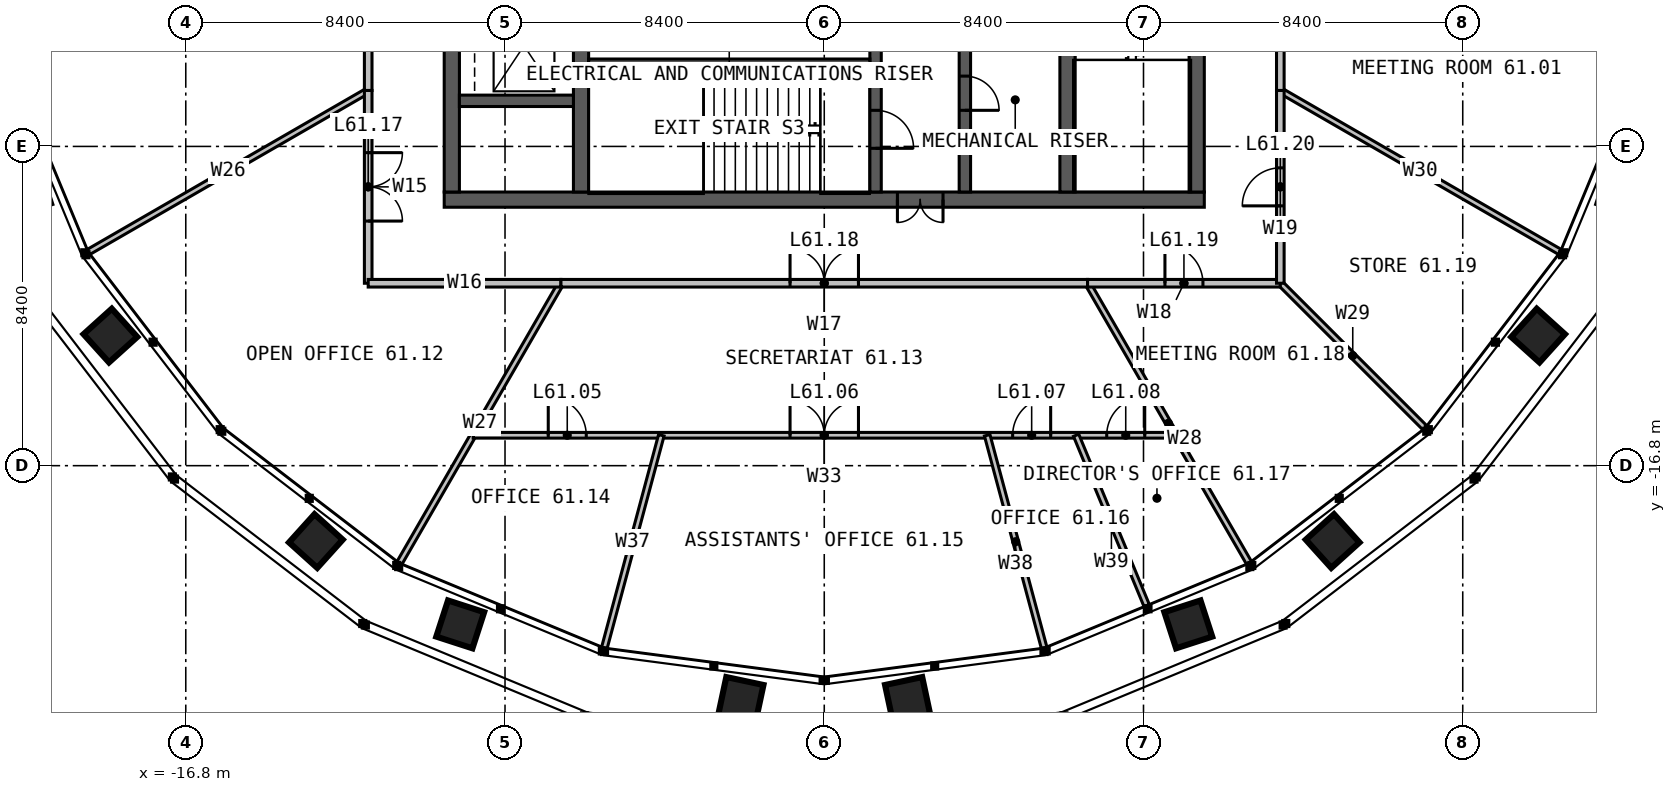
"""IFC4 building model, lengths in metres.
Left out: names, types, materials, properties, quantities, classifications, styles, units other than length and angle.
Written with IfcOpenShell. Run it as: python <this file> out.ifc"""

import sys

from ifc_helpers import new_model, si_unit, direction, frame, frame_2d, origin, place, context, subcontext, project, spatial, rectangle, extrude, element, fill, save


model = new_model("IFC4")
c1 = context("Model", 3, precision=1e-05, world=origin(), true_north=direction((0.0, 1.0)))
c2 = subcontext(c1, "Body", "Model", "MODEL_VIEW")
j1 = project(units=[si_unit("LENGTHUNIT", "METRE"), si_unit("PLANEANGLEUNIT", "RADIAN")], contexts=[c1])
p1 = place(None, origin())
s1 = spatial("IfcSite", under=j1, at=p1, CompositionType="ELEMENT")
p2 = place(p1, origin())
s2 = spatial("IfcBuilding", under=s1, at=p2, CompositionType="ELEMENT")
p3 = place(p2, frame((0.0, 0.0, 252.0)))
s3 = spatial("IfcBuildingStorey", under=s2, at=p3, CompositionType="ELEMENT", Elevation=252.0)
p4 = place(p3, frame((10.0, -9.8, 0.0), z_axis=(0.0, 0.0, 1.0), x_axis=(-1.0, 0.0, 0.0)))
e1 = element("IfcWall", 1, at=p4, inside=s3, PredefinedType="SOLIDWALL", context=c2, shape_type="SweptSolid", body=[
    extrude(rectangle(XDim=20.0, YDim=0.4, at=frame_2d((10.0, 0.0))), origin(), (0.0, 0.0, 1.0), 4.0),
])
p5 = place(p4, frame((6.875, 0.0, 0.0)))
e2 = element("IfcOpeningElement", 2, at=p5, cuts=e1, PredefinedType="OPENING", context=c2, shape_type="SweptSolid", body=[
    extrude(rectangle(XDim=1.2, YDim=2.2, at=frame_2d((0.6, 1.1))), frame((0.0, 0.21, 0.0), z_axis=(0.0, -1.0, 0.0), x_axis=(1.0, 0.0, 0.0)), (0.0, 0.0, 1.0), 0.42),
])
for number, where, z_axis, x_axis in (
    (3, (9.8, -9.6, 0.0), (0.0, 0.0, 1.0), (0.0, 1.0, 0.0)),
    (4, (-9.8, 9.6, 0.0), (0.0, 0.0, 1.0), (0.0, -1.0, 0.0)),
):
    element("IfcWall", number, at=place(p3, frame(where, z_axis=z_axis, x_axis=x_axis)), inside=s3, PredefinedType="SOLIDWALL", context=c2, shape_type="SweptSolid", body=[
        extrude(rectangle(XDim=19.2, YDim=0.4, at=frame_2d((9.6, 0.0))), origin(), (0.0, 0.0, 1.0), 4.0),
    ])
p6 = place(p3, frame((-6.4, -9.6, 0.0), z_axis=(0.0, 0.0, 1.0), x_axis=(0.0, 1.0, 0.0)))
e5 = element("IfcWall", 5, at=p6, inside=s3, PredefinedType="SOLIDWALL", context=c2, shape_type="SweptSolid", body=[
    extrude(rectangle(XDim=19.2, YDim=0.4, at=frame_2d((9.6, 0.0))), origin(), (0.0, 0.0, 1.0), 4.0),
])
p7 = place(p6, frame((9.1, 0.0, 0.0)))
e6 = element("IfcOpeningElement", 6, at=p7, cuts=e5, PredefinedType="OPENING", context=c2, shape_type="SweptSolid", body=[
    extrude(rectangle(XDim=1.0, YDim=2.2, at=frame_2d((0.5, 1.1))), frame((0.0, 0.21, 0.0), z_axis=(0.0, -1.0, 0.0), x_axis=(1.0, 0.0, 0.0)), (0.0, 0.0, 1.0), 0.42),
])
p8 = place(p3, frame((6.4, 9.6, 0.0), z_axis=(0.0, 0.0, 1.0), x_axis=(0.0, -1.0, 0.0)))
e7 = element("IfcWall", 7, at=p8, inside=s3, PredefinedType="SOLIDWALL", context=c2, shape_type="SweptSolid", body=[
    extrude(rectangle(XDim=19.2, YDim=0.4, at=frame_2d((9.6, 0.0))), origin(), (0.0, 0.0, 1.0), 4.0),
])
p9 = place(p8, frame((9.1, 0.0, 0.0)))
e8 = element("IfcOpeningElement", 8, at=p9, cuts=e7, PredefinedType="OPENING", context=c2, shape_type="SweptSolid", body=[
    extrude(rectangle(XDim=1.0, YDim=2.2, at=frame_2d((0.5, 1.1))), frame((0.0, 0.21, 0.0), z_axis=(0.0, -1.0, 0.0), x_axis=(1.0, 0.0, 0.0)), (0.0, 0.0, 1.0), 0.42),
])
p10 = place(p3, frame((1.35, -1.45, 0.0), z_axis=(0.0, 0.0, 1.0), x_axis=(0.0, -1.0, 0.0)))
e9 = element("IfcWall", 9, at=p10, inside=s3, PredefinedType="SOLIDWALL", context=c2, shape_type="SweptSolid", body=[
    extrude(rectangle(XDim=8.15, YDim=0.3, at=frame_2d((4.075, 0.0))), origin(), (0.0, 0.0, 1.0), 4.0),
])
p11 = place(p10, frame((6.0, 0.0, 0.0)))
e10 = element("IfcOpeningElement", 10, at=p11, cuts=e9, PredefinedType="OPENING", context=c2, shape_type="SweptSolid", body=[
    extrude(rectangle(XDim=1.0, YDim=2.2, at=frame_2d((0.5, 1.1))), frame((0.0, 0.16, 0.0), z_axis=(0.0, -1.0, 0.0), x_axis=(1.0, 0.0, 0.0)), (0.0, 0.0, 1.0), 0.32),
])
p12 = place(p10, frame((3.525, 0.0, 0.0)))
e11 = element("IfcOpeningElement", 11, at=p12, cuts=e9, PredefinedType="OPENING", context=c2, shape_type="SweptSolid", body=[
    extrude(rectangle(XDim=0.9, YDim=2.2, at=frame_2d((0.45, 1.1))), frame((0.0, 0.16, 0.0), z_axis=(0.0, -1.0, 0.0), x_axis=(1.0, 0.0, 0.0)), (0.0, 0.0, 1.0), 0.32),
])
p13 = place(p3, frame((3.7, -1.45, 0.0), z_axis=(0.0, 0.0, 1.0), x_axis=(0.0, -1.0, 0.0)))
e12 = element("IfcWall", 12, at=p13, inside=s3, PredefinedType="SOLIDWALL", context=c2, shape_type="SweptSolid", body=[
    extrude(rectangle(XDim=8.15, YDim=0.3, at=frame_2d((4.075, 0.0))), origin(), (0.0, 0.0, 1.0), 4.0),
])
p14 = place(p13, frame((5.1, 0.0, 0.0)))
e13 = element("IfcOpeningElement", 13, at=p14, cuts=e12, PredefinedType="OPENING", context=c2, shape_type="SweptSolid", body=[
    extrude(rectangle(XDim=0.9, YDim=2.2, at=frame_2d((0.45, 1.1))), frame((0.0, 0.16, 0.0), z_axis=(0.0, -1.0, 0.0), x_axis=(1.0, 0.0, 0.0)), (0.0, 0.0, 1.0), 0.32),
])
p15 = place(p3, frame((-6.2, -6.2, 0.0), z_axis=(0.0, 0.0, 1.0), x_axis=(1.0, 0.0, 0.0)))
e14 = element("IfcWall", 14, at=p15, inside=s3, PredefinedType="SOLIDWALL", context=c2, shape_type="SweptSolid", body=[
    extrude(rectangle(XDim=7.4, YDim=0.2, at=frame_2d((3.7, 0.0))), origin(), (0.0, 0.0, 1.0), 4.0),
])
p16 = place(p3, frame((-9.6, -7.2, 0.0), z_axis=(0.0, 0.0, 1.0), x_axis=(1.0, 0.0, 0.0)))
e15 = element("IfcWall", 15, at=p16, inside=s3, PredefinedType="SOLIDWALL", context=c2, shape_type="SweptSolid", body=[
    extrude(rectangle(XDim=3.0, YDim=0.3, at=frame_2d((1.5, 0.0))), origin(), (0.0, 0.0, 1.0), 4.0),
])
for number, where, z_axis, x_axis in (
    (16, (12.0, -6.928, 0.0), (0.0, 0.0, 1.0), (0.866, -0.5, 0.0)),
    (17, (-12.0, -6.928, 0.0), (0.0, 0.0, 1.0), (-0.866, -0.5, 0.0)),
    (18, (-6.928, -12.0, 0.0), (0.0, 0.0, 1.0), (-0.5, -0.866, 0.0)),
    (19, (6.928, -12.0, 0.0), (0.0, 0.0, 1.0), (0.5, -0.866, 0.0)),
):
    element("IfcWall", number, at=place(p3, frame(where, z_axis=z_axis, x_axis=x_axis)), inside=s3, PredefinedType="PARTITIONING", context=c2, shape_type="SweptSolid", body=[
        extrude(rectangle(XDim=8.505, YDim=0.15, at=frame_2d((4.252, 0.0))), origin(), (0.0, 0.0, 1.0), 2.79),
    ])
p17 = place(p3, frame((12.0, -12.0, 0.0), z_axis=(0.0, 0.0, 1.0), x_axis=(0.707106781187, -0.707106781187, 0.0)))
e20 = element("IfcWall", 20, at=p17, inside=s3, PredefinedType="PARTITIONING", context=c2, shape_type="SweptSolid", body=[
    extrude(rectangle(XDim=5.391, YDim=0.15, at=frame_2d((2.695, 0.0))), origin(), (0.0, 0.0, 1.0), 2.79),
])
p18 = place(p3, frame((12.0, -6.928, 0.0), z_axis=(0.0, 0.0, 1.0), x_axis=(0.0, 1.0, 0.0)))
e21 = element("IfcWall", 21, at=p18, inside=s3, PredefinedType="PARTITIONING", context=c2, shape_type="SweptSolid", body=[
    extrude(rectangle(XDim=5.348, YDim=0.2, at=frame_2d((2.674, 0.0))), origin(), (0.0, 0.0, 1.0), 3.8),
])
p19 = place(p18, frame((2.174, 0.0, 0.0)))
e22 = element("IfcOpeningElement", 22, at=p19, cuts=e21, PredefinedType="OPENING", context=c2, shape_type="SweptSolid", body=[
    extrude(rectangle(XDim=1.0, YDim=2.2, at=frame_2d((0.5, 1.1))), frame((0.0, 0.11, 0.0), z_axis=(0.0, -1.0, 0.0), x_axis=(1.0, 0.0, 0.0)), (0.0, 0.0, 1.0), 0.22),
])
p20 = place(p3, frame((-12.0, 6.928, 0.0), z_axis=(0.0, 0.0, 1.0), x_axis=(0.0, -1.0, 0.0)))
e23 = element("IfcWall", 23, at=p20, inside=s3, PredefinedType="PARTITIONING", context=c2, shape_type="SweptSolid", body=[
    extrude(rectangle(XDim=13.856, YDim=0.2, at=frame_2d((6.928, 0.0))), origin(), (0.0, 0.0, 1.0), 3.8),
])
p21 = place(p20, frame((6.028, 0.0, 0.0)))
e24 = element("IfcOpeningElement", 24, at=p21, cuts=e23, PredefinedType="OPENING", context=c2, shape_type="SweptSolid", body=[
    extrude(rectangle(XDim=1.8, YDim=2.2, at=frame_2d((0.9, 1.1))), frame((0.0, 0.11, 0.0), z_axis=(0.0, -1.0, 0.0), x_axis=(1.0, 0.0, 0.0)), (0.0, 0.0, 1.0), 0.22),
])
p22 = place(p3, frame((-12.0, -6.928, 0.0), z_axis=(0.0, 0.0, 1.0), x_axis=(0.0, -1.0, 0.0)))
e25 = element("IfcWall", 25, at=p22, inside=s3, PredefinedType="PARTITIONING", context=c2, shape_type="SweptSolid", body=[
    extrude(rectangle(XDim=5.072, YDim=0.2, at=frame_2d((2.536, 0.0))), origin(), (0.0, 0.0, 1.0), 3.8),
])
p23 = place(p22, frame((1.636, 0.0, 0.0)))
e26 = element("IfcOpeningElement", 26, at=p23, cuts=e25, PredefinedType="OPENING", context=c2, shape_type="SweptSolid", body=[
    extrude(rectangle(XDim=1.8, YDim=2.2, at=frame_2d((0.9, 1.1))), frame((0.0, 0.11, 0.0), z_axis=(0.0, -1.0, 0.0), x_axis=(1.0, 0.0, 0.0)), (0.0, 0.0, 1.0), 0.22),
])
p24 = place(p3, frame((-12.0, -12.0, 0.0), z_axis=(0.0, 0.0, 1.0), x_axis=(1.0, 0.0, 0.0)))
e27 = element("IfcWall", 27, at=p24, inside=s3, PredefinedType="PARTITIONING", context=c2, shape_type="SweptSolid", body=[
    extrude(rectangle(XDim=5.072, YDim=0.2, at=frame_2d((2.536, 0.0))), origin(), (0.0, 0.0, 1.0), 3.8),
])
p25 = place(p3, frame((-9.238, -16.0, 0.0), z_axis=(0.0, 0.0, 1.0), x_axis=(1.0, 0.0, 0.0)))
e28 = element("IfcWall", 28, at=p25, inside=s3, PredefinedType="PARTITIONING", context=c2, shape_type="SweptSolid", body=[
    extrude(rectangle(XDim=18.475, YDim=0.15, at=frame_2d((9.238, 0.0))), origin(), (0.0, 0.0, 1.0), 2.79),
])
p26 = place(p25, frame((1.975, 0.0, 0.0)))
e29 = element("IfcOpeningElement", 29, at=p26, cuts=e28, PredefinedType="OPENING", context=c2, shape_type="SweptSolid", body=[
    extrude(rectangle(XDim=1.0, YDim=2.2, at=frame_2d((0.5, 1.1))), frame((0.0, 0.085, 0.0), z_axis=(0.0, -1.0, 0.0), x_axis=(1.0, 0.0, 0.0)), (0.0, 0.0, 1.0), 0.17),
])
p27 = place(p25, frame((8.338, 0.0, 0.0)))
e30 = element("IfcOpeningElement", 30, at=p27, cuts=e28, PredefinedType="OPENING", context=c2, shape_type="SweptSolid", body=[
    extrude(rectangle(XDim=1.8, YDim=2.2, at=frame_2d((0.9, 1.1))), frame((0.0, 0.085, 0.0), z_axis=(0.0, -1.0, 0.0), x_axis=(1.0, 0.0, 0.0)), (0.0, 0.0, 1.0), 0.17),
])
p28 = place(p25, frame((14.195, 0.0, 0.0)))
e31 = element("IfcOpeningElement", 31, at=p28, cuts=e28, PredefinedType="OPENING", context=c2, shape_type="SweptSolid", body=[
    extrude(rectangle(XDim=1.0, YDim=2.2, at=frame_2d((0.5, 1.1))), frame((0.0, 0.085, 0.0), z_axis=(0.0, -1.0, 0.0), x_axis=(1.0, 0.0, 0.0)), (0.0, 0.0, 1.0), 0.17),
])
p29 = place(p25, frame((16.67, 0.0, 0.0)))
e32 = element("IfcOpeningElement", 32, at=p29, cuts=e28, PredefinedType="OPENING", context=c2, shape_type="SweptSolid", body=[
    extrude(rectangle(XDim=1.0, YDim=2.2, at=frame_2d((0.5, 1.1))), frame((0.0, 0.085, 0.0), z_axis=(0.0, -1.0, 0.0), x_axis=(1.0, 0.0, 0.0)), (0.0, 0.0, 1.0), 0.17),
])
for number, where, z_axis, x_axis in (
    (33, (-4.287, -16.0, 0.0), (0.0, 0.0, 1.0), (-0.259, -0.966, 0.0)),
    (34, (4.287, -16.0, 0.0), (0.0, 0.0, 1.0), (0.259, -0.966, 0.0)),
):
    element("IfcWall", number, at=place(p3, frame(where, z_axis=z_axis, x_axis=x_axis)), inside=s3, PredefinedType="PARTITIONING", context=c2, shape_type="SweptSolid", body=[
        extrude(rectangle(XDim=5.797, YDim=0.15, at=frame_2d((2.898, 0.0))), origin(), (0.0, 0.0, 1.0), 2.79),
    ])
p30 = place(p3, frame((6.627, -16.0, 0.0), z_axis=(0.0, 0.0, 1.0), x_axis=(0.38268510723, -0.923878838758, 0.0)))
e35 = element("IfcWall", 35, at=p30, inside=s3, PredefinedType="PARTITIONING", context=c2, shape_type="SweptSolid", body=[
    extrude(rectangle(XDim=4.852, YDim=0.15, at=frame_2d((2.426, 0.0))), origin(), (0.0, 0.0, 1.0), 2.79),
])
p31 = place(p3, frame((-6.928, -12.0, 0.0), z_axis=(0.0, 0.0, 1.0), x_axis=(1.0, 0.0, 0.0)))
e36 = element("IfcWall", 36, at=p31, inside=s3, PredefinedType="PARTITIONING", context=c2, shape_type="SweptSolid", body=[
    extrude(rectangle(XDim=13.856, YDim=0.2, at=frame_2d((6.928, 0.0))), origin(), (0.0, 0.0, 1.0), 3.8),
])
p32 = place(p31, frame((6.028, 0.0, 0.0)))
e37 = element("IfcOpeningElement", 37, at=p32, cuts=e36, PredefinedType="OPENING", context=c2, shape_type="SweptSolid", body=[
    extrude(rectangle(XDim=1.8, YDim=2.2, at=frame_2d((0.9, 1.1))), frame((0.0, 0.11, 0.0), z_axis=(0.0, -1.0, 0.0), x_axis=(1.0, 0.0, 0.0)), (0.0, 0.0, 1.0), 0.22),
])
p33 = place(p3, frame((6.928, -12.0, 0.0), z_axis=(0.0, 0.0, 1.0), x_axis=(1.0, 0.0, 0.0)))
e38 = element("IfcWall", 38, at=p33, inside=s3, PredefinedType="PARTITIONING", context=c2, shape_type="SweptSolid", body=[
    extrude(rectangle(XDim=5.072, YDim=0.2, at=frame_2d((2.536, 0.0))), origin(), (0.0, 0.0, 1.0), 3.8),
])
p34 = place(p33, frame((2.036, 0.0, 0.0)))
e39 = element("IfcOpeningElement", 39, at=p34, cuts=e38, PredefinedType="OPENING", context=c2, shape_type="SweptSolid", body=[
    extrude(rectangle(XDim=1.0, YDim=2.2, at=frame_2d((0.5, 1.1))), frame((0.0, 0.11, 0.0), z_axis=(0.0, -1.0, 0.0), x_axis=(1.0, 0.0, 0.0)), (0.0, 0.0, 1.0), 0.22),
])
p35 = place(p3, frame((12.0, -12.0, 0.0), z_axis=(0.0, 0.0, 1.0), x_axis=(0.0, 1.0, 0.0)))
e40 = element("IfcWall", 40, at=p35, inside=s3, PredefinedType="PARTITIONING", context=c2, shape_type="SweptSolid", body=[
    extrude(rectangle(XDim=5.072, YDim=0.2, at=frame_2d((2.536, 0.0))), origin(), (0.0, 0.0, 1.0), 3.8),
])
p36 = place(p35, frame((2.036, 0.0, 0.0)))
e41 = element("IfcOpeningElement", 41, at=p36, cuts=e40, PredefinedType="OPENING", context=c2, shape_type="SweptSolid", body=[
    extrude(rectangle(XDim=1.0, YDim=2.2, at=frame_2d((0.5, 1.1))), frame((0.0, 0.11, 0.0), z_axis=(0.0, -1.0, 0.0), x_axis=(1.0, 0.0, 0.0)), (0.0, 0.0, 1.0), 0.22),
])
p37 = place(p5, origin())
e42 = element("IfcDoor", 42, at=p37, inside=s3, OperationType="DOUBLE_DOOR_SINGLE_SWING", PredefinedType="DOOR", context=c2, shape_type="SweptSolid", body=[
    extrude(rectangle(XDim=1.2, YDim=2.2, at=frame_2d((0.6, 1.1))), frame((0.0, 0.025, 0.0), z_axis=(0.0, -1.0, 0.0), x_axis=(1.0, 0.0, 0.0)), (0.0, 0.0, 1.0), 0.05),
])
fill(e2, e42)
p38 = place(p11, origin())
e43 = element("IfcDoor", 43, at=p38, inside=s3, OperationType="SINGLE_SWING_RIGHT", PredefinedType="DOOR", context=c2, shape_type="SweptSolid", body=[
    extrude(rectangle(XDim=1.0, YDim=2.2, at=frame_2d((0.5, 1.1))), frame((0.0, 0.025, 0.0), z_axis=(0.0, -1.0, 0.0), x_axis=(1.0, 0.0, 0.0)), (0.0, 0.0, 1.0), 0.05),
])
fill(e10, e43)
p39 = place(p14, origin())
e44 = element("IfcDoor", 44, at=p39, inside=s3, OperationType="SINGLE_SWING_RIGHT", PredefinedType="DOOR", context=c2, shape_type="SweptSolid", body=[
    extrude(rectangle(XDim=0.9, YDim=2.2, at=frame_2d((0.45, 1.1))), frame((0.0, 0.025, 0.0), z_axis=(0.0, -1.0, 0.0), x_axis=(1.0, 0.0, 0.0)), (0.0, 0.0, 1.0), 0.05),
])
fill(e13, e44)
p40 = place(p23, origin())
e45 = element("IfcDoor", 45, at=p40, inside=s3, OperationType="DOUBLE_DOOR_SINGLE_SWING", PredefinedType="DOOR", context=c2, shape_type="SweptSolid", body=[
    extrude(rectangle(XDim=1.8, YDim=2.2, at=frame_2d((0.9, 1.1))), frame((0.0, 0.025, 0.0), z_axis=(0.0, -1.0, 0.0), x_axis=(1.0, 0.0, 0.0)), (0.0, 0.0, 1.0), 0.05),
])
fill(e26, e45)
p41 = place(p26, origin())
e46 = element("IfcDoor", 46, at=p41, inside=s3, OperationType="SINGLE_SWING_LEFT", PredefinedType="DOOR", context=c2, shape_type="SweptSolid", body=[
    extrude(rectangle(XDim=1.0, YDim=2.2, at=frame_2d((0.5, 1.1))), frame((0.0, 0.025, 0.0), z_axis=(0.0, -1.0, 0.0), x_axis=(1.0, 0.0, 0.0)), (0.0, 0.0, 1.0), 0.05),
])
fill(e29, e46)
p42 = place(p27, origin())
e47 = element("IfcDoor", 47, at=p42, inside=s3, OperationType="DOUBLE_DOOR_SINGLE_SWING", PredefinedType="DOOR", context=c2, shape_type="SweptSolid", body=[
    extrude(rectangle(XDim=1.8, YDim=2.2, at=frame_2d((0.9, 1.1))), frame((0.0, 0.025, 0.0), z_axis=(0.0, -1.0, 0.0), x_axis=(1.0, 0.0, 0.0)), (0.0, 0.0, 1.0), 0.05),
])
fill(e30, e47)
p43 = place(p28, origin())
e48 = element("IfcDoor", 48, at=p43, inside=s3, OperationType="SINGLE_SWING_RIGHT", PredefinedType="DOOR", context=c2, shape_type="SweptSolid", body=[
    extrude(rectangle(XDim=1.0, YDim=2.2, at=frame_2d((0.5, 1.1))), frame((0.0, 0.025, 0.0), z_axis=(0.0, -1.0, 0.0), x_axis=(1.0, 0.0, 0.0)), (0.0, 0.0, 1.0), 0.05),
])
fill(e31, e48)
p44 = place(p29, origin())
e49 = element("IfcDoor", 49, at=p44, inside=s3, OperationType="SINGLE_SWING_RIGHT", PredefinedType="DOOR", context=c2, shape_type="SweptSolid", body=[
    extrude(rectangle(XDim=1.0, YDim=2.2, at=frame_2d((0.5, 1.1))), frame((0.0, 0.025, 0.0), z_axis=(0.0, -1.0, 0.0), x_axis=(1.0, 0.0, 0.0)), (0.0, 0.0, 1.0), 0.05),
])
fill(e32, e49)
p45 = place(p32, origin())
e50 = element("IfcDoor", 50, at=p45, inside=s3, OperationType="DOUBLE_DOOR_SINGLE_SWING", PredefinedType="DOOR", context=c2, shape_type="SweptSolid", body=[
    extrude(rectangle(XDim=1.8, YDim=2.2, at=frame_2d((0.9, 1.1))), frame((0.0, 0.025, 0.0), z_axis=(0.0, -1.0, 0.0), x_axis=(1.0, 0.0, 0.0)), (0.0, 0.0, 1.0), 0.05),
])
fill(e37, e50)
p46 = place(p34, origin())
e51 = element("IfcDoor", 51, at=p46, inside=s3, OperationType="SINGLE_SWING_LEFT", PredefinedType="DOOR", context=c2, shape_type="SweptSolid", body=[
    extrude(rectangle(XDim=1.0, YDim=2.2, at=frame_2d((0.5, 1.1))), frame((0.0, 0.025, 0.0), z_axis=(0.0, -1.0, 0.0), x_axis=(1.0, 0.0, 0.0)), (0.0, 0.0, 1.0), 0.05),
])
fill(e39, e51)
p47 = place(p36, origin())
e52 = element("IfcDoor", 52, at=p47, inside=s3, OperationType="SINGLE_SWING_LEFT", PredefinedType="DOOR", context=c2, shape_type="SweptSolid", body=[
    extrude(rectangle(XDim=1.0, YDim=2.2, at=frame_2d((0.5, 1.1))), frame((0.0, 0.025, 0.0), z_axis=(0.0, -1.0, 0.0), x_axis=(1.0, 0.0, 0.0)), (0.0, 0.0, 1.0), 0.05),
])
fill(e41, e52)
save(model, sys.argv[1])
